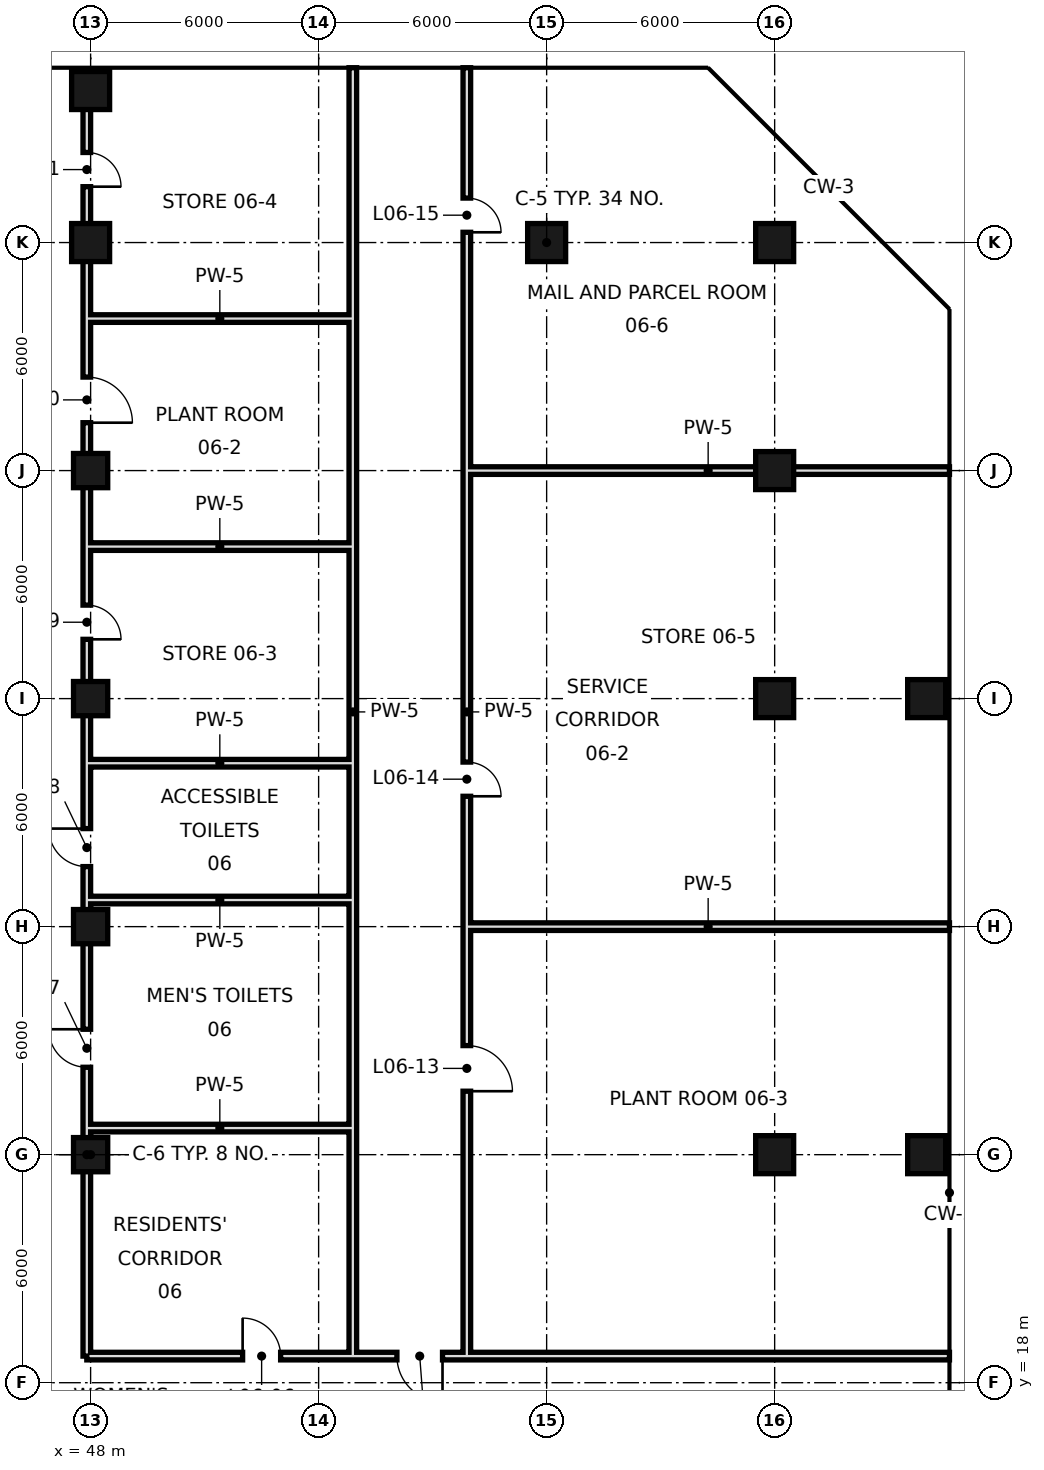
"""IFC4 building model, lengths in metres.
Left out: names, types, materials, properties, quantities, classifications, styles, units other than length and angle.
Written with IfcOpenShell. Run it as: python <this file> out.ifc"""

import sys

from ifc_helpers import new_model, si_unit, direction, frame, frame_2d, origin, origin_2d, place, context, subcontext, project, spatial, rectangle, hollow_rectangle, extrude, element, fill, save


model = new_model("IFC4")
c1 = context("Model", 3, precision=1e-05, world=origin(), true_north=direction((0.0, 1.0)))
c2 = subcontext(c1, "Body", "Model", "MODEL_VIEW")
j1 = project(units=[si_unit("LENGTHUNIT", "METRE"), si_unit("PLANEANGLEUNIT", "RADIAN")], contexts=[c1])
p1 = place(None, origin())
s1 = spatial("IfcSite", under=j1, at=p1, CompositionType="ELEMENT")
p2 = place(p1, origin())
s2 = spatial("IfcBuilding", under=s1, at=p2, CompositionType="ELEMENT")
p3 = place(p2, frame((0.0, 0.0, 39.6)))
s3 = spatial("IfcBuildingStorey", under=s2, at=p3, CompositionType="ELEMENT", Elevation=39.6)
for number, where, z_axis, x_axis in (
    (1, (48.0, 24.0, 0.0), (0.0, 0.0, 1.0), (1.0, 0.0, 0.0)),
    (2, (48.0, 30.0, 0.0), (0.0, 0.0, 1.0), (1.0, 0.0, 0.0)),
    (3, (48.0, 36.0, 0.0), (0.0, 0.0, 1.0), (1.0, 0.0, 0.0)),
    (4, (48.0, 42.0, 0.0), (0.0, 0.0, 1.0), (1.0, 0.0, 0.0)),
):
    element("IfcColumn", number, at=place(p3, frame(where, z_axis=z_axis, x_axis=x_axis)), inside=s3, PredefinedType="COLUMN", context=c2, shape_type="SweptSolid", body=[
        extrude(hollow_rectangle(XDim=0.9, YDim=0.9, WallThickness=0.045, at=origin_2d()), origin(), (0.0, 0.0, 1.0), 4.8),
    ])
for number, where, z_axis, x_axis in (
    (5, (48.0, 48.0, 0.0), (0.0, 0.0, 1.0), (1.0, 0.0, 0.0)),
    (6, (48.0, 52.0, 0.0), (0.0, 0.0, 1.0), (1.0, 0.0, 0.0)),
    (7, (60.0, 48.0, 0.0), (0.0, 0.0, 1.0), (1.0, 0.0, 0.0)),
    (8, (66.0, 24.0, 0.0), (0.0, 0.0, 1.0), (1.0, 0.0, 0.0)),
    (9, (66.0, 36.0, 0.0), (0.0, 0.0, 1.0), (1.0, 0.0, 0.0)),
    (10, (66.0, 42.0, 0.0), (0.0, 0.0, 1.0), (1.0, 0.0, 0.0)),
    (11, (66.0, 48.0, 0.0), (0.0, 0.0, 1.0), (1.0, 0.0, 0.0)),
    (12, (70.0, 24.0, 0.0), (0.0, 0.0, 1.0), (1.0, 0.0, 0.0)),
    (13, (70.0, 36.0, 0.0), (0.0, 0.0, 1.0), (1.0, 0.0, 0.0)),
):
    element("IfcColumn", number, at=place(p3, frame(where, z_axis=z_axis, x_axis=x_axis)), inside=s3, PredefinedType="COLUMN", context=c2, shape_type="SweptSolid", body=[
        extrude(hollow_rectangle(XDim=1.0, YDim=1.0, WallThickness=0.05, at=origin_2d()), origin(), (0.0, 0.0, 1.0), 4.8),
    ])
p4 = place(p3, frame((47.9, 18.7, 0.0), z_axis=(0.0, 0.0, 1.0), x_axis=(0.0, 1.0, 0.0)))
e14 = element("IfcWall", 14, at=p4, inside=s3, PredefinedType="SOLIDWALL", context=c2, shape_type="SweptSolid", body=[
    extrude(rectangle(XDim=33.3, YDim=0.2, at=frame_2d((16.65, 0.0))), origin(), (0.0, 0.0, 1.0), 3.8),
])
p5 = place(p4, frame((7.6, 0.0, 0.0)))
e15 = element("IfcOpeningElement", 15, at=p5, cuts=e14, PredefinedType="OPENING", context=c2, shape_type="SweptSolid", body=[
    extrude(rectangle(XDim=1.0, YDim=2.4, at=frame_2d((0.5, 1.2))), frame((0.0, 0.11, 0.0), z_axis=(0.0, -1.0, 0.0), x_axis=(1.0, 0.0, 0.0)), (0.0, 0.0, 1.0), 0.22),
])
p6 = place(p4, frame((12.88, 0.0, 0.0)))
e16 = element("IfcOpeningElement", 16, at=p6, cuts=e14, PredefinedType="OPENING", context=c2, shape_type="SweptSolid", body=[
    extrude(rectangle(XDim=1.0, YDim=2.4, at=frame_2d((0.5, 1.2))), frame((0.0, 0.11, 0.0), z_axis=(0.0, -1.0, 0.0), x_axis=(1.0, 0.0, 0.0)), (0.0, 0.0, 1.0), 0.22),
])
p7 = place(p4, frame((18.86, 0.0, 0.0)))
e17 = element("IfcOpeningElement", 17, at=p7, cuts=e14, PredefinedType="OPENING", context=c2, shape_type="SweptSolid", body=[
    extrude(rectangle(XDim=0.9, YDim=2.1, at=frame_2d((0.45, 1.05))), frame((0.0, 0.11, 0.0), z_axis=(0.0, -1.0, 0.0), x_axis=(1.0, 0.0, 0.0)), (0.0, 0.0, 1.0), 0.22),
])
p8 = place(p4, frame((24.56, 0.0, 0.0)))
e18 = element("IfcOpeningElement", 18, at=p8, cuts=e14, PredefinedType="OPENING", context=c2, shape_type="SweptSolid", body=[
    extrude(rectangle(XDim=1.2, YDim=2.4, at=frame_2d((0.6, 1.2))), frame((0.0, 0.11, 0.0), z_axis=(0.0, -1.0, 0.0), x_axis=(1.0, 0.0, 0.0)), (0.0, 0.0, 1.0), 0.22),
])
p9 = place(p4, frame((30.77, 0.0, 0.0)))
e19 = element("IfcOpeningElement", 19, at=p9, cuts=e14, PredefinedType="OPENING", context=c2, shape_type="SweptSolid", body=[
    extrude(rectangle(XDim=0.9, YDim=2.1, at=frame_2d((0.45, 1.05))), frame((0.0, 0.11, 0.0), z_axis=(0.0, -1.0, 0.0), x_axis=(1.0, 0.0, 0.0)), (0.0, 0.0, 1.0), 0.22),
])
p10 = place(p3, frame((54.9, 18.7, 0.0), z_axis=(0.0, 0.0, 1.0), x_axis=(0.0, 1.0, 0.0)))
e20 = element("IfcWall", 20, at=p10, inside=s3, PredefinedType="SOLIDWALL", context=c2, shape_type="SweptSolid", body=[
    extrude(rectangle(XDim=33.9, YDim=0.2, at=frame_2d((16.95, 0.0))), origin(), (0.0, 0.0, 1.0), 3.6),
])
p11 = place(p3, frame((57.9, 18.7, 0.0), z_axis=(0.0, 0.0, 1.0), x_axis=(0.0, 1.0, 0.0)))
e21 = element("IfcWall", 21, at=p11, inside=s3, PredefinedType="SOLIDWALL", context=c2, shape_type="SweptSolid", body=[
    extrude(rectangle(XDim=33.9, YDim=0.2, at=frame_2d((16.95, 0.0))), origin(), (0.0, 0.0, 1.0), 3.6),
])
p12 = place(p11, frame((6.97, 0.0, 0.0)))
e22 = element("IfcOpeningElement", 22, at=p12, cuts=e21, PredefinedType="OPENING", context=c2, shape_type="SweptSolid", body=[
    extrude(rectangle(XDim=1.2, YDim=2.4, at=frame_2d((0.6, 1.2))), frame((0.0, 0.11, 0.0), z_axis=(0.0, -1.0, 0.0), x_axis=(1.0, 0.0, 0.0)), (0.0, 0.0, 1.0), 0.22),
])
p13 = place(p11, frame((14.73, 0.0, 0.0)))
e23 = element("IfcOpeningElement", 23, at=p13, cuts=e21, PredefinedType="OPENING", context=c2, shape_type="SweptSolid", body=[
    extrude(rectangle(XDim=0.9, YDim=2.1, at=frame_2d((0.45, 1.05))), frame((0.0, 0.11, 0.0), z_axis=(0.0, -1.0, 0.0), x_axis=(1.0, 0.0, 0.0)), (0.0, 0.0, 1.0), 0.22),
])
p14 = place(p11, frame((29.57, 0.0, 0.0)))
e24 = element("IfcOpeningElement", 24, at=p14, cuts=e21, PredefinedType="OPENING", context=c2, shape_type="SweptSolid", body=[
    extrude(rectangle(XDim=0.9, YDim=2.1, at=frame_2d((0.45, 1.05))), frame((0.0, 0.11, 0.0), z_axis=(0.0, -1.0, 0.0), x_axis=(1.0, 0.0, 0.0)), (0.0, 0.0, 1.0), 0.22),
])
p15 = place(p3, frame((47.9, 18.7, 0.0), z_axis=(0.0, 0.0, 1.0), x_axis=(1.0, 0.0, 0.0)))
e25 = element("IfcWall", 25, at=p15, inside=s3, PredefinedType="SOLIDWALL", context=c2, shape_type="SweptSolid", body=[
    extrude(rectangle(XDim=22.7, YDim=0.2, at=frame_2d((11.35, 0.0))), origin(), (0.0, 0.0, 1.0), 3.8),
])
p16 = place(p15, frame((4.1, 0.0, 0.0)))
e26 = element("IfcOpeningElement", 26, at=p16, cuts=e25, PredefinedType="OPENING", context=c2, shape_type="SweptSolid", body=[
    extrude(rectangle(XDim=1.0, YDim=2.4, at=frame_2d((0.5, 1.2))), frame((0.0, 0.11, 0.0), z_axis=(0.0, -1.0, 0.0), x_axis=(1.0, 0.0, 0.0)), (0.0, 0.0, 1.0), 0.22),
])
p17 = place(p15, frame((8.16, 0.0, 0.0)))
e27 = element("IfcOpeningElement", 27, at=p17, cuts=e25, PredefinedType="OPENING", context=c2, shape_type="SweptSolid", body=[
    extrude(rectangle(XDim=1.2, YDim=2.4, at=frame_2d((0.6, 1.2))), frame((0.0, 0.11, 0.0), z_axis=(0.0, -1.0, 0.0), x_axis=(1.0, 0.0, 0.0)), (0.0, 0.0, 1.0), 0.22),
])
p18 = place(p3, frame((47.9, 24.7, 0.0), z_axis=(0.0, 0.0, 1.0), x_axis=(1.0, 0.0, 0.0)))
e28 = element("IfcWall", 28, at=p18, inside=s3, PredefinedType="SOLIDWALL", context=c2, shape_type="SweptSolid", body=[
    extrude(rectangle(XDim=7.0, YDim=0.2, at=frame_2d((3.5, 0.0))), origin(), (0.0, 0.0, 1.0), 4.05),
])
p19 = place(p3, frame((57.9, 30.0, 0.0), z_axis=(0.0, 0.0, 1.0), x_axis=(1.0, 0.0, 0.0)))
e29 = element("IfcWall", 29, at=p19, inside=s3, PredefinedType="SOLIDWALL", context=c2, shape_type="SweptSolid", body=[
    extrude(rectangle(XDim=12.7, YDim=0.2, at=frame_2d((6.35, 0.0))), origin(), (0.0, 0.0, 1.0), 3.6),
])
for number, where, z_axis, x_axis in (
    (30, (47.9, 30.7, 0.0), (0.0, 0.0, 1.0), (1.0, 0.0, 0.0)),
    (31, (47.9, 34.3, 0.0), (0.0, 0.0, 1.0), (1.0, 0.0, 0.0)),
    (32, (47.9, 40.0, 0.0), (0.0, 0.0, 1.0), (1.0, 0.0, 0.0)),
):
    element("IfcWall", number, at=place(p3, frame(where, z_axis=z_axis, x_axis=x_axis)), inside=s3, PredefinedType="SOLIDWALL", context=c2, shape_type="SweptSolid", body=[
        extrude(rectangle(XDim=7.0, YDim=0.2, at=frame_2d((3.5, 0.0))), origin(), (0.0, 0.0, 1.0), 4.05),
    ])
p20 = place(p3, frame((57.9, 42.0, 0.0), z_axis=(0.0, 0.0, 1.0), x_axis=(1.0, 0.0, 0.0)))
e33 = element("IfcWall", 33, at=p20, inside=s3, PredefinedType="SOLIDWALL", context=c2, shape_type="SweptSolid", body=[
    extrude(rectangle(XDim=12.7, YDim=0.2, at=frame_2d((6.35, 0.0))), origin(), (0.0, 0.0, 1.0), 3.6),
])
p21 = place(p3, frame((47.9, 46.0, 0.0), z_axis=(0.0, 0.0, 1.0), x_axis=(1.0, 0.0, 0.0)))
e34 = element("IfcWall", 34, at=p21, inside=s3, PredefinedType="SOLIDWALL", context=c2, shape_type="SweptSolid", body=[
    extrude(rectangle(XDim=7.0, YDim=0.2, at=frame_2d((3.5, 0.0))), origin(), (0.0, 0.0, 1.0), 4.05),
])
p22 = place(p16, origin())
e35 = element("IfcDoor", 35, at=p22, inside=s3, OperationType="SINGLE_SWING_LEFT", PredefinedType="DOOR", context=c2, shape_type="SweptSolid", body=[
    extrude(rectangle(XDim=1.0, YDim=2.4, at=frame_2d((0.5, 1.2))), frame((0.0, 0.025, 0.0), z_axis=(0.0, -1.0, 0.0), x_axis=(1.0, 0.0, 0.0)), (0.0, 0.0, 1.0), 0.05),
])
fill(e26, e35)
p23 = place(p5, frame((1.0, 0.0, 0.0), z_axis=(0.0, 0.0, 1.0), x_axis=(-1.0, 0.0, 0.0)))
e36 = element("IfcDoor", 36, at=p23, inside=s3, OperationType="SINGLE_SWING_LEFT", PredefinedType="DOOR", context=c2, shape_type="SweptSolid", body=[
    extrude(rectangle(XDim=1.0, YDim=2.4, at=frame_2d((0.5, 1.2))), frame((0.0, 0.025, 0.0), z_axis=(0.0, -1.0, 0.0), x_axis=(1.0, 0.0, 0.0)), (0.0, 0.0, 1.0), 0.05),
])
fill(e15, e36)
p24 = place(p6, frame((1.0, 0.0, 0.0), z_axis=(0.0, 0.0, 1.0), x_axis=(-1.0, 0.0, 0.0)))
e37 = element("IfcDoor", 37, at=p24, inside=s3, OperationType="SINGLE_SWING_LEFT", PredefinedType="DOOR", context=c2, shape_type="SweptSolid", body=[
    extrude(rectangle(XDim=1.0, YDim=2.4, at=frame_2d((0.5, 1.2))), frame((0.0, 0.025, 0.0), z_axis=(0.0, -1.0, 0.0), x_axis=(1.0, 0.0, 0.0)), (0.0, 0.0, 1.0), 0.05),
])
fill(e16, e37)
p25 = place(p7, frame((0.9, 0.0, 0.0), z_axis=(0.0, 0.0, 1.0), x_axis=(-1.0, 0.0, 0.0)))
e38 = element("IfcDoor", 38, at=p25, inside=s3, OperationType="SINGLE_SWING_RIGHT", PredefinedType="DOOR", context=c2, shape_type="SweptSolid", body=[
    extrude(rectangle(XDim=0.9, YDim=2.1, at=frame_2d((0.45, 1.05))), frame((0.0, 0.025, 0.0), z_axis=(0.0, -1.0, 0.0), x_axis=(1.0, 0.0, 0.0)), (0.0, 0.0, 1.0), 0.05),
])
fill(e17, e38)
p26 = place(p8, frame((1.2, 0.0, 0.0), z_axis=(0.0, 0.0, 1.0), x_axis=(-1.0, 0.0, 0.0)))
e39 = element("IfcDoor", 39, at=p26, inside=s3, OperationType="SINGLE_SWING_RIGHT", PredefinedType="DOOR", context=c2, shape_type="SweptSolid", body=[
    extrude(rectangle(XDim=1.2, YDim=2.4, at=frame_2d((0.6, 1.2))), frame((0.0, 0.025, 0.0), z_axis=(0.0, -1.0, 0.0), x_axis=(1.0, 0.0, 0.0)), (0.0, 0.0, 1.0), 0.05),
])
fill(e18, e39)
p27 = place(p9, frame((0.9, 0.0, 0.0), z_axis=(0.0, 0.0, 1.0), x_axis=(-1.0, 0.0, 0.0)))
e40 = element("IfcDoor", 40, at=p27, inside=s3, OperationType="SINGLE_SWING_RIGHT", PredefinedType="DOOR", context=c2, shape_type="SweptSolid", body=[
    extrude(rectangle(XDim=0.9, YDim=2.1, at=frame_2d((0.45, 1.05))), frame((0.0, 0.025, 0.0), z_axis=(0.0, -1.0, 0.0), x_axis=(1.0, 0.0, 0.0)), (0.0, 0.0, 1.0), 0.05),
])
fill(e19, e40)
p28 = place(p17, origin())
e41 = element("IfcDoor", 41, at=p28, inside=s3, OperationType="SINGLE_SWING_RIGHT", PredefinedType="DOOR", context=c2, shape_type="SweptSolid", body=[
    extrude(rectangle(XDim=1.2, YDim=2.4, at=frame_2d((0.6, 1.2))), frame((0.0, 0.025, 0.0), z_axis=(0.0, -1.0, 0.0), x_axis=(1.0, 0.0, 0.0)), (0.0, 0.0, 1.0), 0.05),
])
fill(e27, e41)
p29 = place(p12, frame((1.2, 0.0, 0.0), z_axis=(0.0, 0.0, 1.0), x_axis=(-1.0, 0.0, 0.0)))
e42 = element("IfcDoor", 42, at=p29, inside=s3, OperationType="SINGLE_SWING_RIGHT", PredefinedType="DOOR", context=c2, shape_type="SweptSolid", body=[
    extrude(rectangle(XDim=1.2, YDim=2.4, at=frame_2d((0.6, 1.2))), frame((0.0, 0.025, 0.0), z_axis=(0.0, -1.0, 0.0), x_axis=(1.0, 0.0, 0.0)), (0.0, 0.0, 1.0), 0.05),
])
fill(e22, e42)
p30 = place(p13, frame((0.9, 0.0, 0.0), z_axis=(0.0, 0.0, 1.0), x_axis=(-1.0, 0.0, 0.0)))
e43 = element("IfcDoor", 43, at=p30, inside=s3, OperationType="SINGLE_SWING_RIGHT", PredefinedType="DOOR", context=c2, shape_type="SweptSolid", body=[
    extrude(rectangle(XDim=0.9, YDim=2.1, at=frame_2d((0.45, 1.05))), frame((0.0, 0.025, 0.0), z_axis=(0.0, -1.0, 0.0), x_axis=(1.0, 0.0, 0.0)), (0.0, 0.0, 1.0), 0.05),
])
fill(e23, e43)
p31 = place(p14, frame((0.9, 0.0, 0.0), z_axis=(0.0, 0.0, 1.0), x_axis=(-1.0, 0.0, 0.0)))
e44 = element("IfcDoor", 44, at=p31, inside=s3, OperationType="SINGLE_SWING_RIGHT", PredefinedType="DOOR", context=c2, shape_type="SweptSolid", body=[
    extrude(rectangle(XDim=0.9, YDim=2.1, at=frame_2d((0.45, 1.05))), frame((0.0, 0.025, 0.0), z_axis=(0.0, -1.0, 0.0), x_axis=(1.0, 0.0, 0.0)), (0.0, 0.0, 1.0), 0.05),
])
fill(e24, e44)
save(model, sys.argv[1])
